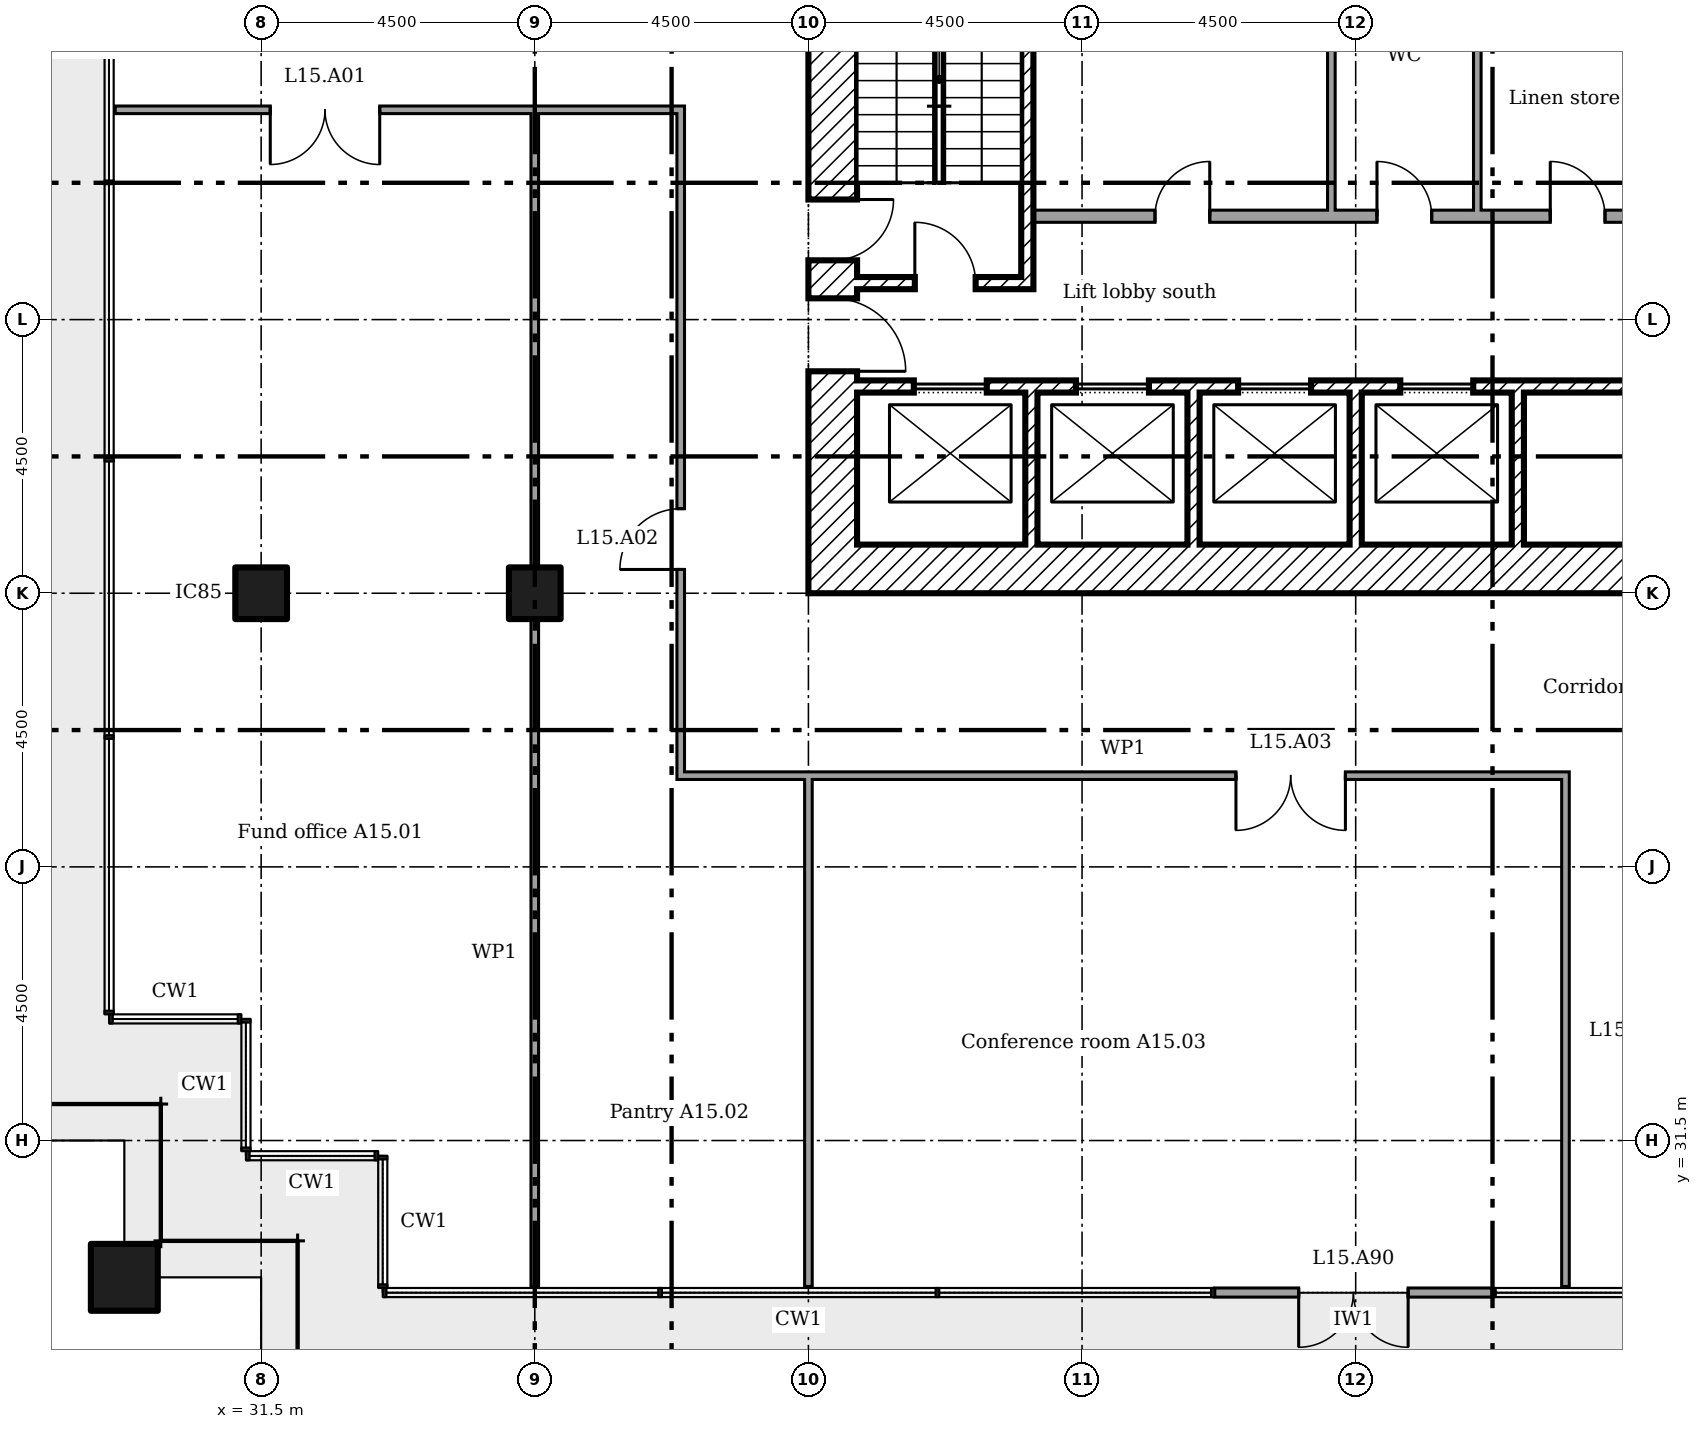
"""IFC4 building model, lengths in metres.
Left out: names, types, materials, properties, quantities, classifications, styles, units other than length and angle.
Written with IfcOpenShell. Run it as: python <this file> out.ifc"""

import sys

from ifc_helpers import new_model, si_unit, direction, frame, frame_2d, origin, origin_2d, place, context, subcontext, project, spatial, rectangle, extrude, element, fill, save


model = new_model("IFC4")
c1 = context("Model", 3, precision=1e-05, world=origin(), true_north=direction((0.0, 1.0)))
c2 = subcontext(c1, "Body", "Model", "MODEL_VIEW")
j1 = project(units=[si_unit("LENGTHUNIT", "METRE"), si_unit("PLANEANGLEUNIT", "RADIAN")], contexts=[c1])
p1 = place(None, origin())
s1 = spatial("IfcSite", under=j1, at=p1, CompositionType="ELEMENT")
p2 = place(p1, origin())
s2 = spatial("IfcBuilding", under=s1, at=p2, CompositionType="ELEMENT")
p3 = place(p2, frame((0.0, 0.0, 65.4)))
s3 = spatial("IfcBuildingStorey", under=s2, at=p3, CompositionType="ELEMENT", Elevation=65.4)
p4 = place(p3, frame((29.25, 29.25, 0.0)))
e1 = element("IfcColumn", 1, at=p4, inside=s3, PredefinedType="COLUMN", context=c2, shape_type="SweptSolid", body=[
    extrude(rectangle(XDim=1.1, YDim=1.1, at=origin_2d()), origin(), (0.0, 0.0, 1.0), 3.6),
])
for number, where in (
    (2, (31.5, 40.5, 0.0)),
    (3, (36.0, 40.5, 0.0)),
):
    element("IfcColumn", number, at=place(p3, frame(where)), inside=s3, PredefinedType="COLUMN", context=c2, shape_type="SweptSolid", body=[
        extrude(rectangle(XDim=0.85, YDim=0.85, at=origin_2d()), origin(), (0.0, 0.0, 1.0), 3.6),
    ])
p5 = place(p3, frame((47.182, 29.0, 0.0)))
e4 = element("IfcWall", 4, at=p5, inside=s3, PredefinedType="SOLIDWALL", context=c2, shape_type="SweptSolid", body=[
    extrude(rectangle(XDim=4.561, YDim=0.15, at=frame_2d((2.28, 0.0))), origin(), (0.0, 0.0, 1.0), 3.45),
])
p6 = place(p5, frame((1.38, 0.0, 0.0)))
e5 = element("IfcOpeningElement", 5, at=p6, cuts=e4, PredefinedType="OPENING", context=c2, shape_type="SweptSolid", body=[
    extrude(rectangle(XDim=1.8, YDim=2.4, at=frame_2d((0.9, 1.2))), frame((0.0, 0.085, 0.0), z_axis=(0.0, -1.0, 0.0), x_axis=(1.0, 0.0, 0.0)), (0.0, 0.0, 1.0), 0.17),
])
p7 = place(p3, frame((41.3, 40.9, 0.0)))
e6 = element("IfcWall", 6, at=p7, inside=s3, PredefinedType="SHEAR", context=c2, shape_type="SweptSolid", body=[
    extrude(rectangle(XDim=16.4, YDim=0.8, at=frame_2d((8.2, 0.0))), origin(), (0.0, 0.0, 1.0), 3.35),
])
p8 = place(p3, frame((40.9, 40.5, 0.0), z_axis=(0.0, 0.0, 1.0), x_axis=(0.0, 1.0, 0.0)))
e7 = element("IfcWall", 7, at=p8, inside=s3, PredefinedType="SHEAR", context=c2, shape_type="SweptSolid", body=[
    extrude(rectangle(XDim=18.0, YDim=0.8, at=frame_2d((9.0, 0.0))), origin(), (0.0, 0.0, 1.0), 3.35),
])
p9 = place(p8, frame((3.65, 0.0, 0.0)))
e8 = element("IfcOpeningElement", 8, at=p9, cuts=e7, PredefinedType="OPENING", context=c2, shape_type="SweptSolid", body=[
    extrude(rectangle(XDim=1.2, YDim=2.1, at=frame_2d((0.6, 1.05))), frame((0.0, 0.41, 0.0), z_axis=(0.0, -1.0, 0.0), x_axis=(1.0, 0.0, 0.0)), (0.0, 0.0, 1.0), 0.82),
])
p10 = place(p8, frame((5.475, 0.0, 0.0)))
e9 = element("IfcOpeningElement", 9, at=p10, cuts=e7, PredefinedType="OPENING", context=c2, shape_type="SweptSolid", body=[
    extrude(rectangle(XDim=1.0, YDim=2.1, at=frame_2d((0.5, 1.05))), frame((0.0, 0.41, 0.0), z_axis=(0.0, -1.0, 0.0), x_axis=(1.0, 0.0, 0.0)), (0.0, 0.0, 1.0), 0.82),
])
p11 = place(p8, frame((12.3, 0.0, 0.0)))
e10 = element("IfcOpeningElement", 10, at=p11, cuts=e7, PredefinedType="OPENING", context=c2, shape_type="SweptSolid", body=[
    extrude(rectangle(XDim=1.0, YDim=2.1, at=frame_2d((0.5, 1.05))), frame((0.0, 0.41, 0.0), z_axis=(0.0, -1.0, 0.0), x_axis=(1.0, 0.0, 0.0)), (0.0, 0.0, 1.0), 0.82),
])
for number, where, z_axis, x_axis in (
    (11, (44.167, 41.3, 0.0), (0.0, 0.0, 1.0), (0.0, 1.0, 0.0)),
    (12, (46.833, 41.3, 0.0), (0.0, 0.0, 1.0), (0.0, 1.0, 0.0)),
    (13, (49.5, 41.3, 0.0), (0.0, 0.0, 1.0), (0.0, 1.0, 0.0)),
    (14, (52.167, 41.3, 0.0), (0.0, 0.0, 1.0), (0.0, 1.0, 0.0)),
):
    element("IfcWall", number, at=place(p3, frame(where, z_axis=z_axis, x_axis=x_axis)), inside=s3, PredefinedType="SHEAR", context=c2, shape_type="SweptSolid", body=[
        extrude(rectangle(XDim=2.5, YDim=0.2, at=frame_2d((1.25, 0.0))), origin(), (0.0, 0.0, 1.0), 3.35),
    ])
p12 = place(p3, frame((41.3, 43.9, 0.0)))
e15 = element("IfcWall", 15, at=p12, inside=s3, PredefinedType="SHEAR", context=c2, shape_type="SweptSolid", body=[
    extrude(rectangle(XDim=16.4, YDim=0.2, at=frame_2d((8.2, 0.0))), origin(), (0.0, 0.0, 1.0), 3.35),
])
p13 = place(p12, frame((0.933, 0.0, 0.0)))
e16 = element("IfcOpeningElement", 16, at=p13, cuts=e15, PredefinedType="OPENING", context=c2, shape_type="SweptSolid", body=[
    extrude(rectangle(XDim=1.2, YDim=2.1, at=frame_2d((0.6, 1.05))), frame((0.0, 0.11, 0.0), z_axis=(0.0, -1.0, 0.0), x_axis=(1.0, 0.0, 0.0)), (0.0, 0.0, 1.0), 0.22),
])
p14 = place(p12, frame((3.6, 0.0, 0.0)))
e17 = element("IfcOpeningElement", 17, at=p14, cuts=e15, PredefinedType="OPENING", context=c2, shape_type="SweptSolid", body=[
    extrude(rectangle(XDim=1.2, YDim=2.1, at=frame_2d((0.6, 1.05))), frame((0.0, 0.11, 0.0), z_axis=(0.0, -1.0, 0.0), x_axis=(1.0, 0.0, 0.0)), (0.0, 0.0, 1.0), 0.22),
])
p15 = place(p12, frame((6.267, 0.0, 0.0)))
e18 = element("IfcOpeningElement", 18, at=p15, cuts=e15, PredefinedType="OPENING", context=c2, shape_type="SweptSolid", body=[
    extrude(rectangle(XDim=1.2, YDim=2.1, at=frame_2d((0.6, 1.05))), frame((0.0, 0.11, 0.0), z_axis=(0.0, -1.0, 0.0), x_axis=(1.0, 0.0, 0.0)), (0.0, 0.0, 1.0), 0.22),
])
p16 = place(p12, frame((8.933, 0.0, 0.0)))
e19 = element("IfcOpeningElement", 19, at=p16, cuts=e15, PredefinedType="OPENING", context=c2, shape_type="SweptSolid", body=[
    extrude(rectangle(XDim=1.2, YDim=2.1, at=frame_2d((0.6, 1.05))), frame((0.0, 0.11, 0.0), z_axis=(0.0, -1.0, 0.0), x_axis=(1.0, 0.0, 0.0)), (0.0, 0.0, 1.0), 0.22),
])
p17 = place(p3, frame((44.1, 45.5, 0.0), z_axis=(0.0, 0.0, 1.0), x_axis=(0.0, 1.0, 0.0)))
e20 = element("IfcWall", 20, at=p17, inside=s3, PredefinedType="SHEAR", context=c2, shape_type="SweptSolid", body=[
    extrude(rectangle(XDim=6.9, YDim=0.2, at=frame_2d((3.45, 0.0))), origin(), (0.0, 0.0, 1.0), 3.35),
])
p18 = place(p3, frame((41.3, 45.6, 0.0)))
e21 = element("IfcWall", 21, at=p18, inside=s3, PredefinedType="SHEAR", context=c2, shape_type="SweptSolid", body=[
    extrude(rectangle(XDim=2.7, YDim=0.2, at=frame_2d((1.35, 0.0))), origin(), (0.0, 0.0, 1.0), 3.35),
])
p19 = place(p18, frame((0.95, 0.0, 0.0)))
e22 = element("IfcOpeningElement", 22, at=p19, cuts=e21, PredefinedType="OPENING", context=c2, shape_type="SweptSolid", body=[
    extrude(rectangle(XDim=1.0, YDim=2.1, at=frame_2d((0.5, 1.05))), frame((0.0, 0.11, 0.0), z_axis=(0.0, -1.0, 0.0), x_axis=(1.0, 0.0, 0.0)), (0.0, 0.0, 1.0), 0.22),
])
p20 = place(p3, frame((44.2, 46.7, 0.0)))
e23 = element("IfcWall", 23, at=p20, inside=s3, PredefinedType="PARTITIONING", context=c2, shape_type="SweptSolid", body=[
    extrude(rectangle(XDim=10.6, YDim=0.2, at=frame_2d((5.3, 0.0))), origin(), (0.0, 0.0, 1.0), 3.35),
])
p21 = place(p20, frame((2.0, 0.0, 0.0)))
e24 = element("IfcOpeningElement", 24, at=p21, cuts=e23, PredefinedType="OPENING", context=c2, shape_type="SweptSolid", body=[
    extrude(rectangle(XDim=0.9, YDim=2.1, at=frame_2d((0.45, 1.05))), frame((0.0, 0.11, 0.0), z_axis=(0.0, -1.0, 0.0), x_axis=(1.0, 0.0, 0.0)), (0.0, 0.0, 1.0), 0.22),
])
p22 = place(p20, frame((5.65, 0.0, 0.0)))
e25 = element("IfcOpeningElement", 25, at=p22, cuts=e23, PredefinedType="OPENING", context=c2, shape_type="SweptSolid", body=[
    extrude(rectangle(XDim=0.9, YDim=2.1, at=frame_2d((0.45, 1.05))), frame((0.0, 0.11, 0.0), z_axis=(0.0, -1.0, 0.0), x_axis=(1.0, 0.0, 0.0)), (0.0, 0.0, 1.0), 0.22),
])
p23 = place(p20, frame((8.5, 0.0, 0.0)))
e26 = element("IfcOpeningElement", 26, at=p23, cuts=e23, PredefinedType="OPENING", context=c2, shape_type="SweptSolid", body=[
    extrude(rectangle(XDim=0.9, YDim=2.1, at=frame_2d((0.45, 1.05))), frame((0.0, 0.11, 0.0), z_axis=(0.0, -1.0, 0.0), x_axis=(1.0, 0.0, 0.0)), (0.0, 0.0, 1.0), 0.22),
])
p24 = place(p3, frame((49.1, 46.8, 0.0), z_axis=(0.0, 0.0, 1.0), x_axis=(0.0, 1.0, 0.0)))
e27 = element("IfcWall", 27, at=p24, inside=s3, PredefinedType="PARTITIONING", context=c2, shape_type="SweptSolid", body=[
    extrude(rectangle(XDim=5.0, YDim=0.125, at=frame_2d((2.5, 0.0))), origin(), (0.0, 0.0, 1.0), 3.35),
])
p25 = place(p3, frame((51.5, 46.8, 0.0), z_axis=(0.0, 0.0, 1.0), x_axis=(0.0, 1.0, 0.0)))
e28 = element("IfcWall", 28, at=p25, inside=s3, PredefinedType="PARTITIONING", context=c2, shape_type="SweptSolid", body=[
    extrude(rectangle(XDim=2.762, YDim=0.125, at=frame_2d((1.381, 0.0))), origin(), (0.0, 0.0, 1.0), 3.35),
])
p26 = place(p3, frame((38.337, 37.5, 0.0)))
e29 = element("IfcWall", 29, at=p26, inside=s3, PredefinedType="PARTITIONING", context=c2, shape_type="SweptSolid", body=[
    extrude(rectangle(XDim=14.675, YDim=0.125, at=frame_2d((7.337, 0.0))), origin(), (0.0, 0.0, 1.0), 3.45),
])
p27 = place(p26, frame((9.194, 0.0, 0.0)))
e30 = element("IfcOpeningElement", 30, at=p27, cuts=e29, PredefinedType="OPENING", context=c2, shape_type="SweptSolid", body=[
    extrude(rectangle(XDim=1.8, YDim=2.1, at=frame_2d((0.9, 1.05))), frame((0.0, 0.073, 0.0), z_axis=(0.0, -1.0, 0.0), x_axis=(1.0, 0.0, 0.0)), (0.0, 0.0, 1.0), 0.145),
])
p28 = place(p3, frame((29.1, 48.45, 0.0)))
e31 = element("IfcWall", 31, at=p28, inside=s3, PredefinedType="PARTITIONING", context=c2, shape_type="SweptSolid", body=[
    extrude(rectangle(XDim=9.362, YDim=0.125, at=frame_2d((4.681, 0.0))), origin(), (0.0, 0.0, 1.0), 3.45),
])
p29 = place(p28, frame((2.55, 0.0, 0.0)))
e32 = element("IfcOpeningElement", 32, at=p29, cuts=e31, PredefinedType="OPENING", context=c2, shape_type="SweptSolid", body=[
    extrude(rectangle(XDim=1.8, YDim=2.1, at=frame_2d((0.9, 1.05))), frame((0.0, 0.073, 0.0), z_axis=(0.0, -1.0, 0.0), x_axis=(1.0, 0.0, 0.0)), (0.0, 0.0, 1.0), 0.145),
])
p30 = place(p3, frame((36.0, 29.1, 0.0), z_axis=(0.0, 0.0, 1.0), x_axis=(0.0, 1.0, 0.0)))
e33 = element("IfcWall", 33, at=p30, inside=s3, PredefinedType="PARTITIONING", context=c2, shape_type="SweptSolid", body=[
    extrude(rectangle(XDim=10.975, YDim=0.125, at=frame_2d((5.487, 0.0))), origin(), (0.0, 0.0, 1.0), 2.766),
])
p31 = place(p3, frame((36.0, 40.925, 0.0), z_axis=(0.0, 0.0, 1.0), x_axis=(0.0, 1.0, 0.0)))
e34 = element("IfcWall", 34, at=p31, inside=s3, PredefinedType="PARTITIONING", context=c2, shape_type="SweptSolid", body=[
    extrude(rectangle(XDim=7.525, YDim=0.125, at=frame_2d((3.762, 0.0))), origin(), (0.0, 0.0, 1.0), 3.45),
])
p32 = place(p3, frame((38.4, 37.562, 0.0), z_axis=(0.0, 0.0, 1.0), x_axis=(0.0, 1.0, 0.0)))
e35 = element("IfcWall", 35, at=p32, inside=s3, PredefinedType="PARTITIONING", context=c2, shape_type="SweptSolid", body=[
    extrude(rectangle(XDim=10.825, YDim=0.125, at=frame_2d((5.413, 0.0))), origin(), (0.0, 0.0, 1.0), 3.45),
])
p33 = place(p32, frame((3.329, 0.0, 0.0)))
e36 = element("IfcOpeningElement", 36, at=p33, cuts=e35, PredefinedType="OPENING", context=c2, shape_type="SweptSolid", body=[
    extrude(rectangle(XDim=1.0, YDim=2.1, at=frame_2d((0.5, 1.05))), frame((0.0, 0.073, 0.0), z_axis=(0.0, -1.0, 0.0), x_axis=(1.0, 0.0, 0.0)), (0.0, 0.0, 1.0), 0.145),
])
p34 = place(p3, frame((40.5, 29.1, 0.0), z_axis=(0.0, 0.0, 1.0), x_axis=(0.0, 1.0, 0.0)))
e37 = element("IfcWall", 37, at=p34, inside=s3, PredefinedType="PARTITIONING", context=c2, shape_type="SweptSolid", body=[
    extrude(rectangle(XDim=8.4, YDim=0.125, at=frame_2d((4.2, 0.0))), origin(), (0.0, 0.0, 1.0), 2.766),
])
p35 = place(p3, frame((52.95, 29.1, 0.0), z_axis=(0.0, 0.0, 1.0), x_axis=(0.0, 1.0, 0.0)))
e38 = element("IfcWall", 38, at=p35, inside=s3, PredefinedType="PARTITIONING", context=c2, shape_type="SweptSolid", body=[
    extrude(rectangle(XDim=8.337, YDim=0.125, at=frame_2d((4.169, 0.0))), origin(), (0.0, 0.0, 1.0), 3.45),
])
p36 = place(p6, frame((1.8, 0.0, 0.0), x_axis=(-1.0, 0.0, 0.0)))
e39 = element("IfcDoor", 39, at=p36, inside=s3, OperationType="DOUBLE_DOOR_DOUBLE_SWING", PredefinedType="NOTDEFINED", context=c2, shape_type="SweptSolid", body=[
    extrude(rectangle(XDim=1.8, YDim=2.4, at=frame_2d((0.9, 1.2))), frame((0.0, 0.025, 0.0), z_axis=(0.0, -1.0, 0.0), x_axis=(1.0, 0.0, 0.0)), (0.0, 0.0, 1.0), 0.05),
])
fill(e5, e39)
p37 = place(p9, frame((1.2, 0.0, 0.0), x_axis=(-1.0, 0.0, 0.0)))
e40 = element("IfcDoor", 40, at=p37, inside=s3, OperationType="SINGLE_SWING_LEFT", PredefinedType="DOOR", context=c2, shape_type="SweptSolid", body=[
    extrude(rectangle(XDim=1.2, YDim=2.1, at=frame_2d((0.6, 1.05))), frame((0.0, 0.025, 0.0), z_axis=(0.0, -1.0, 0.0), x_axis=(1.0, 0.0, 0.0)), (0.0, 0.0, 1.0), 0.05),
])
fill(e8, e40)
p38 = place(p19, origin())
e41 = element("IfcDoor", 41, at=p38, inside=s3, OperationType="SINGLE_SWING_RIGHT", PredefinedType="DOOR", context=c2, shape_type="SweptSolid", body=[
    extrude(rectangle(XDim=1.0, YDim=2.1, at=frame_2d((0.5, 1.05))), frame((0.0, 0.025, 0.0), z_axis=(0.0, -1.0, 0.0), x_axis=(1.0, 0.0, 0.0)), (0.0, 0.0, 1.0), 0.05),
])
fill(e22, e41)
p39 = place(p10, frame((1.0, 0.0, 0.0), x_axis=(-1.0, 0.0, 0.0)))
e42 = element("IfcDoor", 42, at=p39, inside=s3, OperationType="SINGLE_SWING_RIGHT", PredefinedType="DOOR", context=c2, shape_type="SweptSolid", body=[
    extrude(rectangle(XDim=1.0, YDim=2.1, at=frame_2d((0.5, 1.05))), frame((0.0, 0.025, 0.0), z_axis=(0.0, -1.0, 0.0), x_axis=(1.0, 0.0, 0.0)), (0.0, 0.0, 1.0), 0.05),
])
fill(e9, e42)
p40 = place(p21, origin())
e43 = element("IfcDoor", 43, at=p40, inside=s3, OperationType="SINGLE_SWING_LEFT", PredefinedType="DOOR", context=c2, shape_type="SweptSolid", body=[
    extrude(rectangle(XDim=0.9, YDim=2.1, at=frame_2d((0.45, 1.05))), frame((0.0, 0.025, 0.0), z_axis=(0.0, -1.0, 0.0), x_axis=(1.0, 0.0, 0.0)), (0.0, 0.0, 1.0), 0.05),
])
fill(e24, e43)
p41 = place(p22, origin())
e44 = element("IfcDoor", 44, at=p41, inside=s3, OperationType="SINGLE_SWING_RIGHT", PredefinedType="DOOR", context=c2, shape_type="SweptSolid", body=[
    extrude(rectangle(XDim=0.9, YDim=2.1, at=frame_2d((0.45, 1.05))), frame((0.0, 0.025, 0.0), z_axis=(0.0, -1.0, 0.0), x_axis=(1.0, 0.0, 0.0)), (0.0, 0.0, 1.0), 0.05),
])
fill(e25, e44)
p42 = place(p23, origin())
e45 = element("IfcDoor", 45, at=p42, inside=s3, OperationType="SINGLE_SWING_RIGHT", PredefinedType="DOOR", context=c2, shape_type="SweptSolid", body=[
    extrude(rectangle(XDim=0.9, YDim=2.1, at=frame_2d((0.45, 1.05))), frame((0.0, 0.025, 0.0), z_axis=(0.0, -1.0, 0.0), x_axis=(1.0, 0.0, 0.0)), (0.0, 0.0, 1.0), 0.05),
])
fill(e26, e45)
p43 = place(p13, origin())
e46 = element("IfcDoor", 46, at=p43, inside=s3, OperationType="SLIDING_TO_LEFT", PredefinedType="DOOR", context=c2, shape_type="SweptSolid", body=[
    extrude(rectangle(XDim=1.2, YDim=2.1, at=frame_2d((0.6, 1.05))), frame((0.0, 0.025, 0.0), z_axis=(0.0, -1.0, 0.0), x_axis=(1.0, 0.0, 0.0)), (0.0, 0.0, 1.0), 0.05),
])
fill(e16, e46)
p44 = place(p14, origin())
e47 = element("IfcDoor", 47, at=p44, inside=s3, OperationType="SLIDING_TO_LEFT", PredefinedType="DOOR", context=c2, shape_type="SweptSolid", body=[
    extrude(rectangle(XDim=1.2, YDim=2.1, at=frame_2d((0.6, 1.05))), frame((0.0, 0.025, 0.0), z_axis=(0.0, -1.0, 0.0), x_axis=(1.0, 0.0, 0.0)), (0.0, 0.0, 1.0), 0.05),
])
fill(e17, e47)
p45 = place(p15, origin())
e48 = element("IfcDoor", 48, at=p45, inside=s3, OperationType="SLIDING_TO_LEFT", PredefinedType="DOOR", context=c2, shape_type="SweptSolid", body=[
    extrude(rectangle(XDim=1.2, YDim=2.1, at=frame_2d((0.6, 1.05))), frame((0.0, 0.025, 0.0), z_axis=(0.0, -1.0, 0.0), x_axis=(1.0, 0.0, 0.0)), (0.0, 0.0, 1.0), 0.05),
])
fill(e18, e48)
p46 = place(p16, origin())
e49 = element("IfcDoor", 49, at=p46, inside=s3, OperationType="SLIDING_TO_LEFT", PredefinedType="DOOR", context=c2, shape_type="SweptSolid", body=[
    extrude(rectangle(XDim=1.2, YDim=2.1, at=frame_2d((0.6, 1.05))), frame((0.0, 0.025, 0.0), z_axis=(0.0, -1.0, 0.0), x_axis=(1.0, 0.0, 0.0)), (0.0, 0.0, 1.0), 0.05),
])
fill(e19, e49)
p47 = place(p29, frame((1.8, 0.0, 0.0), x_axis=(-1.0, 0.0, 0.0)))
e50 = element("IfcDoor", 50, at=p47, inside=s3, OperationType="DOUBLE_DOOR_SINGLE_SWING", PredefinedType="DOOR", context=c2, shape_type="SweptSolid", body=[
    extrude(rectangle(XDim=1.8, YDim=2.1, at=frame_2d((0.9, 1.05))), frame((0.0, 0.025, 0.0), z_axis=(0.0, -1.0, 0.0), x_axis=(1.0, 0.0, 0.0)), (0.0, 0.0, 1.0), 0.05),
])
fill(e32, e50)
p48 = place(p33, origin())
e51 = element("IfcDoor", 51, at=p48, inside=s3, OperationType="SINGLE_SWING_RIGHT", PredefinedType="DOOR", context=c2, shape_type="SweptSolid", body=[
    extrude(rectangle(XDim=1.0, YDim=2.1, at=frame_2d((0.5, 1.05))), frame((0.0, 0.025, 0.0), z_axis=(0.0, -1.0, 0.0), x_axis=(1.0, 0.0, 0.0)), (0.0, 0.0, 1.0), 0.05),
])
fill(e36, e51)
p49 = place(p27, frame((1.8, 0.0, 0.0), x_axis=(-1.0, 0.0, 0.0)))
e52 = element("IfcDoor", 52, at=p49, inside=s3, OperationType="DOUBLE_DOOR_SINGLE_SWING", PredefinedType="DOOR", context=c2, shape_type="SweptSolid", body=[
    extrude(rectangle(XDim=1.8, YDim=2.1, at=frame_2d((0.9, 1.05))), frame((0.0, 0.025, 0.0), z_axis=(0.0, -1.0, 0.0), x_axis=(1.0, 0.0, 0.0)), (0.0, 0.0, 1.0), 0.05),
])
fill(e30, e52)
save(model, sys.argv[1])
